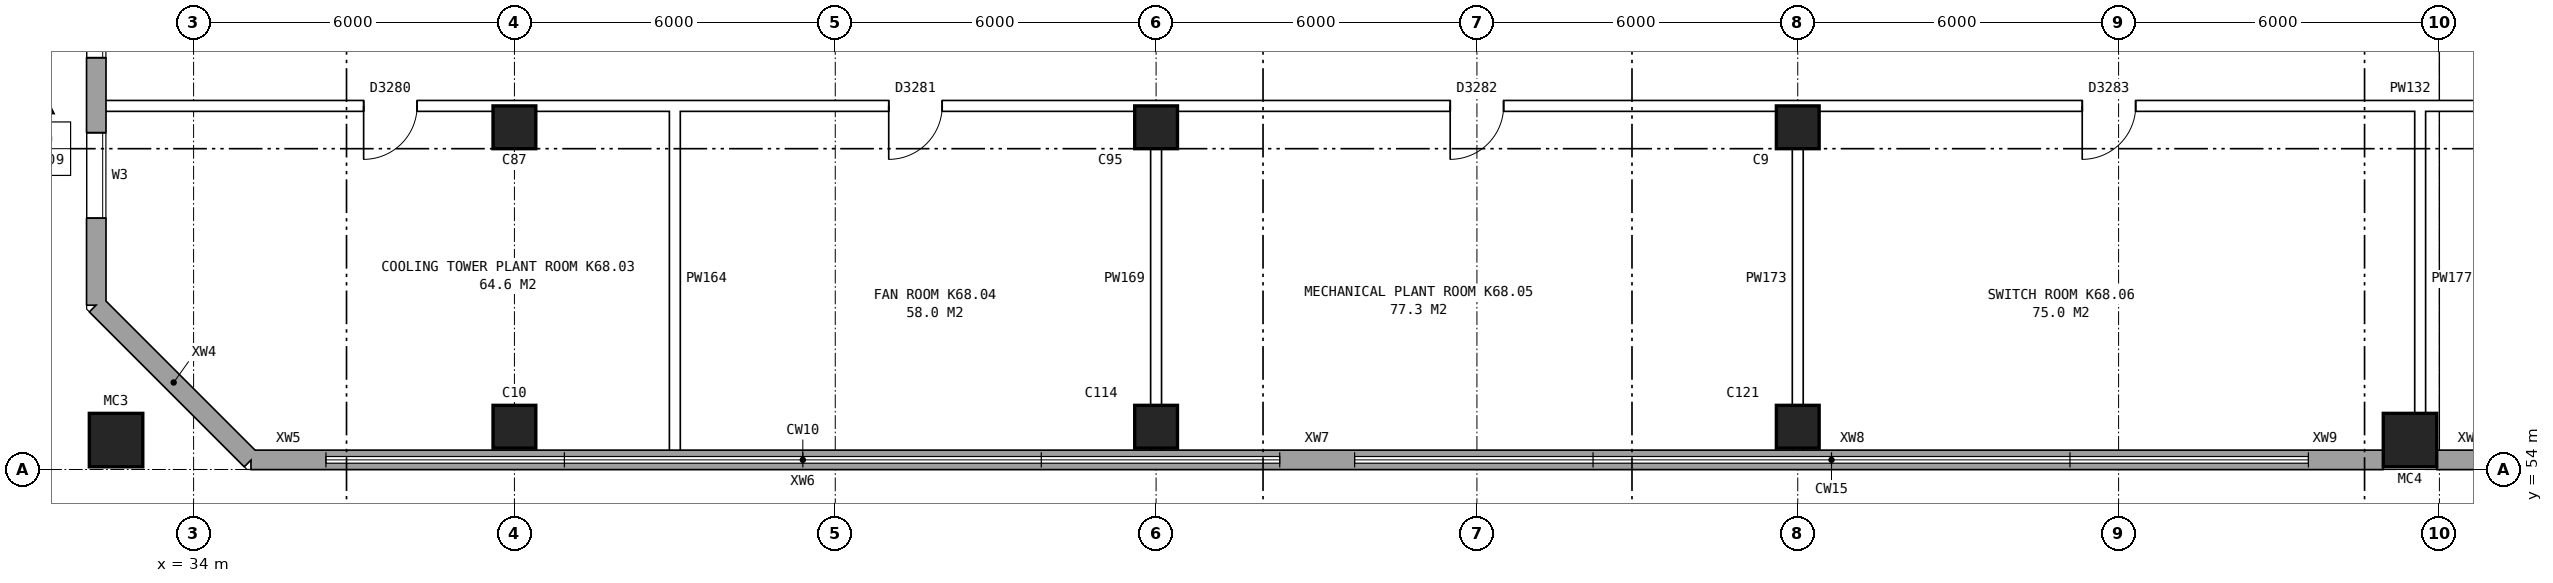
"""IFC4 building model, lengths in metres.
Left out: names, types, materials, properties, quantities, classifications, styles, units other than length and angle.
Written with IfcOpenShell. Run it as: python <this file> out.ifc"""

import sys

from ifc_helpers import new_model, si_unit, direction, frame, frame_2d, origin, origin_2d, place, context, subcontext, project, spatial, polyline, rectangle, hollow_rectangle, outline, extrude, element, fill, save


model = new_model("IFC4")
c1 = context("Model", 3, precision=1e-05, world=origin(), true_north=direction((0.0, 1.0)))
c2 = subcontext(c1, "Body", "Model", "MODEL_VIEW")
j1 = project(units=[si_unit("LENGTHUNIT", "METRE"), si_unit("PLANEANGLEUNIT", "RADIAN")], contexts=[c1])
p1 = place(None, origin())
s1 = spatial("IfcSite", under=j1, at=p1, CompositionType="ELEMENT")
p2 = place(p1, origin())
s2 = spatial("IfcBuilding", under=s1, at=p2, CompositionType="ELEMENT")
p3 = place(p2, frame((0.0, 0.0, 243.9)))
s3 = spatial("IfcBuildingStorey", under=s2, at=p3, CompositionType="ELEMENT", Elevation=243.9)
p4 = place(p3, frame((40.0, 54.8, 0.0), z_axis=(0.0, 0.0, 1.0), x_axis=(1.0, 0.0, 0.0)))
e1 = element("IfcColumn", 1, at=p4, inside=s3, PredefinedType="COLUMN", context=c2, shape_type="SweptSolid", body=[
    extrude(rectangle(XDim=0.8, YDim=0.8, at=origin_2d()), origin(), (0.0, 0.0, 1.0), 3.163),
])
p5 = place(p3, frame((40.0, 60.4, 0.0), z_axis=(0.0, 0.0, 1.0), x_axis=(1.0, 0.0, 0.0)))
e2 = element("IfcColumn", 2, at=p5, inside=s3, PredefinedType="COLUMN", context=c2, shape_type="SweptSolid", body=[
    extrude(rectangle(XDim=0.8, YDim=0.8, at=origin_2d()), origin(), (0.0, 0.0, 1.0), 5.963),
])
p6 = place(p3, frame((52.0, 54.8, 0.0), z_axis=(0.0, 0.0, 1.0), x_axis=(1.0, 0.0, 0.0)))
e3 = element("IfcColumn", 3, at=p6, inside=s3, PredefinedType="COLUMN", context=c2, shape_type="SweptSolid", body=[
    extrude(rectangle(XDim=0.8, YDim=0.8, at=origin_2d()), origin(), (0.0, 0.0, 1.0), 3.163),
])
p7 = place(p3, frame((52.0, 60.4, 0.0), z_axis=(0.0, 0.0, 1.0), x_axis=(1.0, 0.0, 0.0)))
e4 = element("IfcColumn", 4, at=p7, inside=s3, PredefinedType="COLUMN", context=c2, shape_type="SweptSolid", body=[
    extrude(rectangle(XDim=0.8, YDim=0.8, at=origin_2d()), origin(), (0.0, 0.0, 1.0), 5.963),
])
p8 = place(p3, frame((64.0, 54.8, 0.0), z_axis=(0.0, 0.0, 1.0), x_axis=(1.0, 0.0, 0.0)))
e5 = element("IfcColumn", 5, at=p8, inside=s3, PredefinedType="COLUMN", context=c2, shape_type="SweptSolid", body=[
    extrude(rectangle(XDim=0.8, YDim=0.8, at=origin_2d()), origin(), (0.0, 0.0, 1.0), 3.163),
])
p9 = place(p3, frame((64.0, 60.4, 0.0), z_axis=(0.0, 0.0, 1.0), x_axis=(1.0, 0.0, 0.0)))
e6 = element("IfcColumn", 6, at=p9, inside=s3, PredefinedType="COLUMN", context=c2, shape_type="SweptSolid", body=[
    extrude(rectangle(XDim=0.8, YDim=0.8, at=origin_2d()), origin(), (0.0, 0.0, 1.0), 5.963),
])
for number, where, z_axis, x_axis in (
    (7, (32.55, 54.55, 0.0), (0.0, 0.0, 1.0), (1.0, 0.0, 0.0)),
    (8, (75.45, 54.55, 0.0), (0.0, 0.0, 1.0), (1.0, 0.0, 0.0)),
):
    element("IfcColumn", number, at=place(p3, frame(where, z_axis=z_axis, x_axis=x_axis)), inside=s3, PredefinedType="COLUMN", context=c2, shape_type="SweptSolid", body=[
        extrude(hollow_rectangle(XDim=1.0, YDim=1.0, WallThickness=0.055, at=origin_2d()), origin(), (0.0, 0.0, 1.0), 3.038),
    ])
p10 = place(p3, frame((32.18, 57.075, 0.0), z_axis=(0.0, 0.0, 1.0), x_axis=(0.707106781187, -0.707106781187, 0.0)))
e9 = element("IfcWall", 9, at=p10, inside=s3, PredefinedType="STANDARD", context=c2, shape_type="SweptSolid", body=[
    extrude(outline(polyline([(0.0, 0.0), (4.094, 0.0), (4.094, 3.39), (0.0, 4.837), (0.0, 0.0)])), frame((0.0, 0.18, 0.0), z_axis=(0.0, -1.0, 0.0), x_axis=(1.0, 0.0, 0.0)), (0.0, 0.0, 1.0), 0.36),
])
p11 = place(p3, frame((35.075, 54.18, 0.0), z_axis=(0.0, 0.0, 1.0), x_axis=(1.0, 0.0, 0.0)))
e10 = element("IfcWall", 10, at=p11, inside=s3, PredefinedType="STANDARD", context=c2, shape_type="SweptSolid", body=[
    extrude(rectangle(XDim=1.4, YDim=0.36, at=frame_2d((0.7, 0.0))), origin(), (0.0, 0.0, 1.0), 3.39),
])
p12 = place(p3, frame((36.475, 54.18, 0.0), z_axis=(0.0, 0.0, 1.0), x_axis=(1.0, 0.0, 0.0)))
e11 = element("IfcWall", 11, at=p12, inside=s3, PredefinedType="STANDARD", context=c2, shape_type="SweptSolid", body=[
    extrude(rectangle(XDim=17.838, YDim=0.36, at=frame_2d((8.919, 0.0))), origin(), (0.0, 0.0, 1.0), 1.1),
])
p13 = place(p3, frame((54.312, 54.18, 0.0), z_axis=(0.0, 0.0, 1.0), x_axis=(1.0, 0.0, 0.0)))
e12 = element("IfcWall", 12, at=p13, inside=s3, PredefinedType="STANDARD", context=c2, shape_type="SweptSolid", body=[
    extrude(rectangle(XDim=1.4, YDim=0.36, at=frame_2d((0.7, 0.0))), origin(), (0.0, 0.0, 1.0), 3.39),
])
p14 = place(p3, frame((55.712, 54.18, 0.0), z_axis=(0.0, 0.0, 1.0), x_axis=(1.0, 0.0, 0.0)))
e13 = element("IfcWall", 13, at=p14, inside=s3, PredefinedType="STANDARD", context=c2, shape_type="SweptSolid", body=[
    extrude(rectangle(XDim=17.838, YDim=0.36, at=frame_2d((8.919, 0.0))), origin(), (0.0, 0.0, 1.0), 1.1),
])
p15 = place(p3, frame((73.55, 54.18, 0.0), z_axis=(0.0, 0.0, 1.0), x_axis=(1.0, 0.0, 0.0)))
e14 = element("IfcWall", 14, at=p15, inside=s3, PredefinedType="STANDARD", context=c2, shape_type="SweptSolid", body=[
    extrude(rectangle(XDim=1.4, YDim=0.36, at=frame_2d((0.7, 0.0))), origin(), (0.0, 0.0, 1.0), 3.39),
])
p16 = place(p3, frame((75.95, 54.18, 0.0), z_axis=(0.0, 0.0, 1.0), x_axis=(1.0, 0.0, 0.0)))
e15 = element("IfcWall", 15, at=p16, inside=s3, PredefinedType="STANDARD", context=c2, shape_type="SweptSolid", body=[
    extrude(rectangle(XDim=1.4, YDim=0.36, at=frame_2d((0.7, 0.0))), origin(), (0.0, 0.0, 1.0), 3.39),
])
p17 = place(p3, frame((32.18, 82.925, 0.0), z_axis=(0.0, 0.0, 1.0), x_axis=(0.0, -1.0, 0.0)))
e16 = element("IfcWall", 16, at=p17, inside=s3, PredefinedType="STANDARD", context=c2, shape_type="SweptSolid", body=[
    extrude(outline(polyline([(0.0, 0.0), (25.851, 0.0), (25.851, 4.837), (0.0, 17.763), (0.0, 0.0)])), frame((0.0, 0.18, 0.0), z_axis=(0.0, -1.0, 0.0), x_axis=(1.0, 0.0, 0.0)), (0.0, 0.0, 1.0), 0.36),
])
p18 = place(p17, frame((22.625, 0.0, 1.5)))
e17 = element("IfcOpeningElement", 17, at=p18, cuts=e16, PredefinedType="OPENING", context=c2, shape_type="SweptSolid", body=[
    extrude(rectangle(XDim=1.6, YDim=1.2, at=frame_2d((0.8, 0.6))), frame((0.0, 0.19, 0.0), z_axis=(0.0, -1.0, 0.0), x_axis=(1.0, 0.0, 0.0)), (0.0, 0.0, 1.0), 0.38),
])
p19 = place(p17, frame((19.625, 0.0, 1.5)))
e18 = element("IfcOpeningElement", 18, at=p19, cuts=e16, PredefinedType="OPENING", context=c2, shape_type="SweptSolid", body=[
    extrude(rectangle(XDim=1.6, YDim=1.2, at=frame_2d((0.8, 0.6))), frame((0.0, 0.19, 0.0), z_axis=(0.0, -1.0, 0.0), x_axis=(1.0, 0.0, 0.0)), (0.0, 0.0, 1.0), 0.38),
])
p20 = place(p17, frame((4.625, 0.0, 1.5)))
e19 = element("IfcOpeningElement", 19, at=p20, cuts=e16, PredefinedType="OPENING", context=c2, shape_type="SweptSolid", body=[
    extrude(rectangle(XDim=1.6, YDim=1.2, at=frame_2d((0.8, 0.6))), frame((0.0, 0.19, 0.0), z_axis=(0.0, -1.0, 0.0), x_axis=(1.0, 0.0, 0.0)), (0.0, 0.0, 1.0), 0.38),
])
p21 = place(p17, frame((1.625, 0.0, 1.5)))
e20 = element("IfcOpeningElement", 20, at=p21, cuts=e16, PredefinedType="OPENING", context=c2, shape_type="SweptSolid", body=[
    extrude(rectangle(XDim=1.6, YDim=1.2, at=frame_2d((0.8, 0.6))), frame((0.0, 0.19, 0.0), z_axis=(0.0, -1.0, 0.0), x_axis=(1.0, 0.0, 0.0)), (0.0, 0.0, 1.0), 0.38),
])
p22 = place(p3, frame((32.24, 60.8, 0.0), z_axis=(0.0, 0.0, 1.0), x_axis=(1.0, 0.0, 0.0)))
e21 = element("IfcWall", 21, at=p22, inside=s3, PredefinedType="PARTITIONING", context=c2, shape_type="SweptSolid", body=[
    extrude(rectangle(XDim=136.52, YDim=0.2, at=frame_2d((68.26, 0.0))), origin(), (0.0, 0.0, 1.0), 3.3),
])
p23 = place(p22, frame((4.94, 0.0, 0.0)))
e22 = element("IfcOpeningElement", 22, at=p23, cuts=e21, PredefinedType="OPENING", context=c2, shape_type="SweptSolid", body=[
    extrude(rectangle(XDim=1.0, YDim=2.1, at=frame_2d((0.5, 1.05))), frame((0.0, 0.11, 0.0), z_axis=(0.0, -1.0, 0.0), x_axis=(1.0, 0.0, 0.0)), (0.0, 0.0, 1.0), 0.22),
])
p24 = place(p22, frame((14.76, 0.0, 0.0)))
e23 = element("IfcOpeningElement", 23, at=p24, cuts=e21, PredefinedType="OPENING", context=c2, shape_type="SweptSolid", body=[
    extrude(rectangle(XDim=1.0, YDim=2.1, at=frame_2d((0.5, 1.05))), frame((0.0, 0.11, 0.0), z_axis=(0.0, -1.0, 0.0), x_axis=(1.0, 0.0, 0.0)), (0.0, 0.0, 1.0), 0.22),
])
p25 = place(p22, frame((25.26, 0.0, 0.0)))
e24 = element("IfcOpeningElement", 24, at=p25, cuts=e21, PredefinedType="OPENING", context=c2, shape_type="SweptSolid", body=[
    extrude(rectangle(XDim=1.0, YDim=2.1, at=frame_2d((0.5, 1.05))), frame((0.0, 0.11, 0.0), z_axis=(0.0, -1.0, 0.0), x_axis=(1.0, 0.0, 0.0)), (0.0, 0.0, 1.0), 0.22),
])
p26 = place(p22, frame((37.08, 0.0, 0.0)))
e25 = element("IfcOpeningElement", 25, at=p26, cuts=e21, PredefinedType="OPENING", context=c2, shape_type="SweptSolid", body=[
    extrude(rectangle(XDim=1.0, YDim=2.1, at=frame_2d((0.5, 1.05))), frame((0.0, 0.11, 0.0), z_axis=(0.0, -1.0, 0.0), x_axis=(1.0, 0.0, 0.0)), (0.0, 0.0, 1.0), 0.22),
])
p27 = place(p22, frame((53.392, 0.0, 0.0)))
e26 = element("IfcOpeningElement", 26, at=p27, cuts=e21, PredefinedType="OPENING", context=c2, shape_type="SweptSolid", body=[
    extrude(rectangle(XDim=1.0, YDim=2.1, at=frame_2d((0.5, 1.05))), frame((0.0, 0.11, 0.0), z_axis=(0.0, -1.0, 0.0), x_axis=(1.0, 0.0, 0.0)), (0.0, 0.0, 1.0), 0.22),
])
p28 = place(p22, frame((74.198, 0.0, 0.0)))
e27 = element("IfcOpeningElement", 27, at=p28, cuts=e21, PredefinedType="OPENING", context=c2, shape_type="SweptSolid", body=[
    extrude(rectangle(XDim=1.0, YDim=2.1, at=frame_2d((0.5, 1.05))), frame((0.0, 0.11, 0.0), z_axis=(0.0, -1.0, 0.0), x_axis=(1.0, 0.0, 0.0)), (0.0, 0.0, 1.0), 0.22),
])
p29 = place(p22, frame((91.565, 0.0, 0.0)))
e28 = element("IfcOpeningElement", 28, at=p29, cuts=e21, PredefinedType="OPENING", context=c2, shape_type="SweptSolid", body=[
    extrude(rectangle(XDim=1.0, YDim=2.1, at=frame_2d((0.5, 1.05))), frame((0.0, 0.11, 0.0), z_axis=(0.0, -1.0, 0.0), x_axis=(1.0, 0.0, 0.0)), (0.0, 0.0, 1.0), 0.22),
])
p30 = place(p22, frame((104.44, 0.0, 0.0)))
e29 = element("IfcOpeningElement", 29, at=p30, cuts=e21, PredefinedType="OPENING", context=c2, shape_type="SweptSolid", body=[
    extrude(rectangle(XDim=1.0, YDim=2.1, at=frame_2d((0.5, 1.05))), frame((0.0, 0.11, 0.0), z_axis=(0.0, -1.0, 0.0), x_axis=(1.0, 0.0, 0.0)), (0.0, 0.0, 1.0), 0.22),
])
p31 = place(p22, frame((116.26, 0.0, 0.0)))
e30 = element("IfcOpeningElement", 30, at=p31, cuts=e21, PredefinedType="OPENING", context=c2, shape_type="SweptSolid", body=[
    extrude(rectangle(XDim=1.0, YDim=2.1, at=frame_2d((0.5, 1.05))), frame((0.0, 0.11, 0.0), z_axis=(0.0, -1.0, 0.0), x_axis=(1.0, 0.0, 0.0)), (0.0, 0.0, 1.0), 0.22),
])
p32 = place(p22, frame((129.08, 0.0, 0.0)))
e31 = element("IfcOpeningElement", 31, at=p32, cuts=e21, PredefinedType="OPENING", context=c2, shape_type="SweptSolid", body=[
    extrude(rectangle(XDim=1.0, YDim=2.1, at=frame_2d((0.5, 1.05))), frame((0.0, 0.11, 0.0), z_axis=(0.0, -1.0, 0.0), x_axis=(1.0, 0.0, 0.0)), (0.0, 0.0, 1.0), 0.22),
])
for number, where, z_axis, x_axis in (
    (32, (43.0, 54.24, 0.0), (0.0, 0.0, 1.0), (0.0, 1.0, 0.0)),
    (33, (52.0, 54.24, 0.0), (0.0, 0.0, 1.0), (0.0, 1.0, 0.0)),
    (34, (64.0, 54.24, 0.0), (0.0, 0.0, 1.0), (0.0, 1.0, 0.0)),
    (35, (75.64, 54.24, 0.0), (0.0, 0.0, 1.0), (0.0, 1.0, 0.0)),
):
    element("IfcWall", number, at=place(p3, frame(where, z_axis=z_axis, x_axis=x_axis)), inside=s3, PredefinedType="PARTITIONING", context=c2, shape_type="SweptSolid", body=[
        extrude(rectangle(XDim=6.66, YDim=0.2, at=frame_2d((3.33, 0.0))), origin(), (0.0, 0.0, 1.0), 3.3),
    ])
p33 = place(p18, origin())
e36 = element("IfcWindow", 36, at=p33, inside=s3, PartitioningType="DOUBLE_PANEL_HORIZONTAL", PredefinedType="WINDOW", context=c2, shape_type="SweptSolid", body=[
    extrude(rectangle(XDim=1.6, YDim=1.2, at=frame_2d((0.8, 0.6))), frame((0.0, 0.15, 0.0), z_axis=(0.0, -1.0, 0.0), x_axis=(1.0, 0.0, 0.0)), (0.0, 0.0, 1.0), 0.06),
])
fill(e17, e36)
p34 = place(p19, origin())
e37 = element("IfcWindow", 37, at=p34, inside=s3, PartitioningType="DOUBLE_PANEL_HORIZONTAL", PredefinedType="WINDOW", context=c2, shape_type="SweptSolid", body=[
    extrude(rectangle(XDim=1.6, YDim=1.2, at=frame_2d((0.8, 0.6))), frame((0.0, 0.15, 0.0), z_axis=(0.0, -1.0, 0.0), x_axis=(1.0, 0.0, 0.0)), (0.0, 0.0, 1.0), 0.06),
])
fill(e18, e37)
p35 = place(p23, frame((1.0, 0.0, 0.0), z_axis=(0.0, 0.0, 1.0), x_axis=(-1.0, 0.0, 0.0)))
e38 = element("IfcDoor", 38, at=p35, inside=s3, OperationType="SINGLE_SWING_RIGHT", PredefinedType="DOOR", context=c2, shape_type="SweptSolid", body=[
    extrude(rectangle(XDim=1.0, YDim=2.1, at=frame_2d((0.5, 1.05))), frame((0.0, 0.025, 0.0), z_axis=(0.0, -1.0, 0.0), x_axis=(1.0, 0.0, 0.0)), (0.0, 0.0, 1.0), 0.05),
])
fill(e22, e38)
p36 = place(p24, frame((1.0, 0.0, 0.0), z_axis=(0.0, 0.0, 1.0), x_axis=(-1.0, 0.0, 0.0)))
e39 = element("IfcDoor", 39, at=p36, inside=s3, OperationType="SINGLE_SWING_RIGHT", PredefinedType="DOOR", context=c2, shape_type="SweptSolid", body=[
    extrude(rectangle(XDim=1.0, YDim=2.1, at=frame_2d((0.5, 1.05))), frame((0.0, 0.025, 0.0), z_axis=(0.0, -1.0, 0.0), x_axis=(1.0, 0.0, 0.0)), (0.0, 0.0, 1.0), 0.05),
])
fill(e23, e39)
p37 = place(p25, frame((1.0, 0.0, 0.0), z_axis=(0.0, 0.0, 1.0), x_axis=(-1.0, 0.0, 0.0)))
e40 = element("IfcDoor", 40, at=p37, inside=s3, OperationType="SINGLE_SWING_RIGHT", PredefinedType="DOOR", context=c2, shape_type="SweptSolid", body=[
    extrude(rectangle(XDim=1.0, YDim=2.1, at=frame_2d((0.5, 1.05))), frame((0.0, 0.025, 0.0), z_axis=(0.0, -1.0, 0.0), x_axis=(1.0, 0.0, 0.0)), (0.0, 0.0, 1.0), 0.05),
])
fill(e24, e40)
p38 = place(p26, frame((1.0, 0.0, 0.0), z_axis=(0.0, 0.0, 1.0), x_axis=(-1.0, 0.0, 0.0)))
e41 = element("IfcDoor", 41, at=p38, inside=s3, OperationType="SINGLE_SWING_RIGHT", PredefinedType="DOOR", context=c2, shape_type="SweptSolid", body=[
    extrude(rectangle(XDim=1.0, YDim=2.1, at=frame_2d((0.5, 1.05))), frame((0.0, 0.025, 0.0), z_axis=(0.0, -1.0, 0.0), x_axis=(1.0, 0.0, 0.0)), (0.0, 0.0, 1.0), 0.05),
])
fill(e25, e41)
save(model, sys.argv[1])
